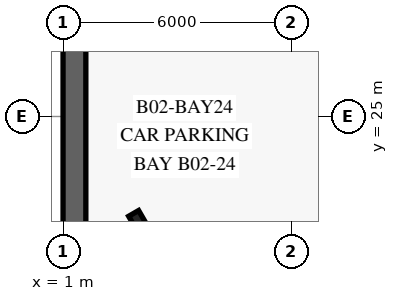
"""IFC4 building model, lengths in metres.
Left out: names, types, materials, properties, quantities, classifications, styles, units other than length and angle.
Written with IfcOpenShell. Run it as: python <this file> out.ifc"""

import sys

from ifc_helpers import new_model, si_unit, direction, frame, frame_2d, origin, origin_2d, place, context, subcontext, project, spatial, rectangle, i_section, extrude, element, save


model = new_model("IFC4")
c1 = context("Model", 3, precision=1e-05, world=origin(), true_north=direction((0.0, 1.0)))
c2 = subcontext(c1, "Body", "Model", "MODEL_VIEW")
j1 = project(units=[si_unit("LENGTHUNIT", "METRE"), si_unit("PLANEANGLEUNIT", "RADIAN")], contexts=[c1])
p1 = place(None, origin())
s1 = spatial("IfcSite", under=j1, at=p1, CompositionType="ELEMENT")
p2 = place(p1, origin())
s2 = spatial("IfcBuilding", under=s1, at=p2, CompositionType="ELEMENT")
p3 = place(p2, frame((0.0, 0.0, -8.4)))
s3 = spatial("IfcBuildingStorey", under=s2, at=p3, CompositionType="ELEMENT", Elevation=-8.4)
p4 = place(p3, frame((1.3, 48.4, 0.0), z_axis=(0.0, 0.0, 1.0), x_axis=(0.0, -1.0, 0.0)))
e1 = element("IfcWall", 1, at=p4, inside=s3, PredefinedType="USERDEFINED", context=c2, shape_type="SweptSolid", body=[
    extrude(rectangle(XDim=46.8, YDim=0.6, at=frame_2d((23.4, 0.0))), origin(), (0.0, 0.0, 1.0), 3.88),
])
p5 = place(p3, frame((3.11, 22.014, 0.0), z_axis=(0.0, 0.0, 1.0), x_axis=(-0.5, 0.866025403784, 0.0)))
e2 = element("IfcColumn", 2, at=p5, inside=s3, PredefinedType="COLUMN", context=c2, shape_type="SweptSolid", body=[
    extrude(i_section(OverallWidth=0.302, OverallDepth=1.008, WebThickness=0.021, FlangeThickness=0.04, at=origin_2d()), origin(), (0.0, 0.0, 1.0), 4.2),
])
save(model, sys.argv[1])
